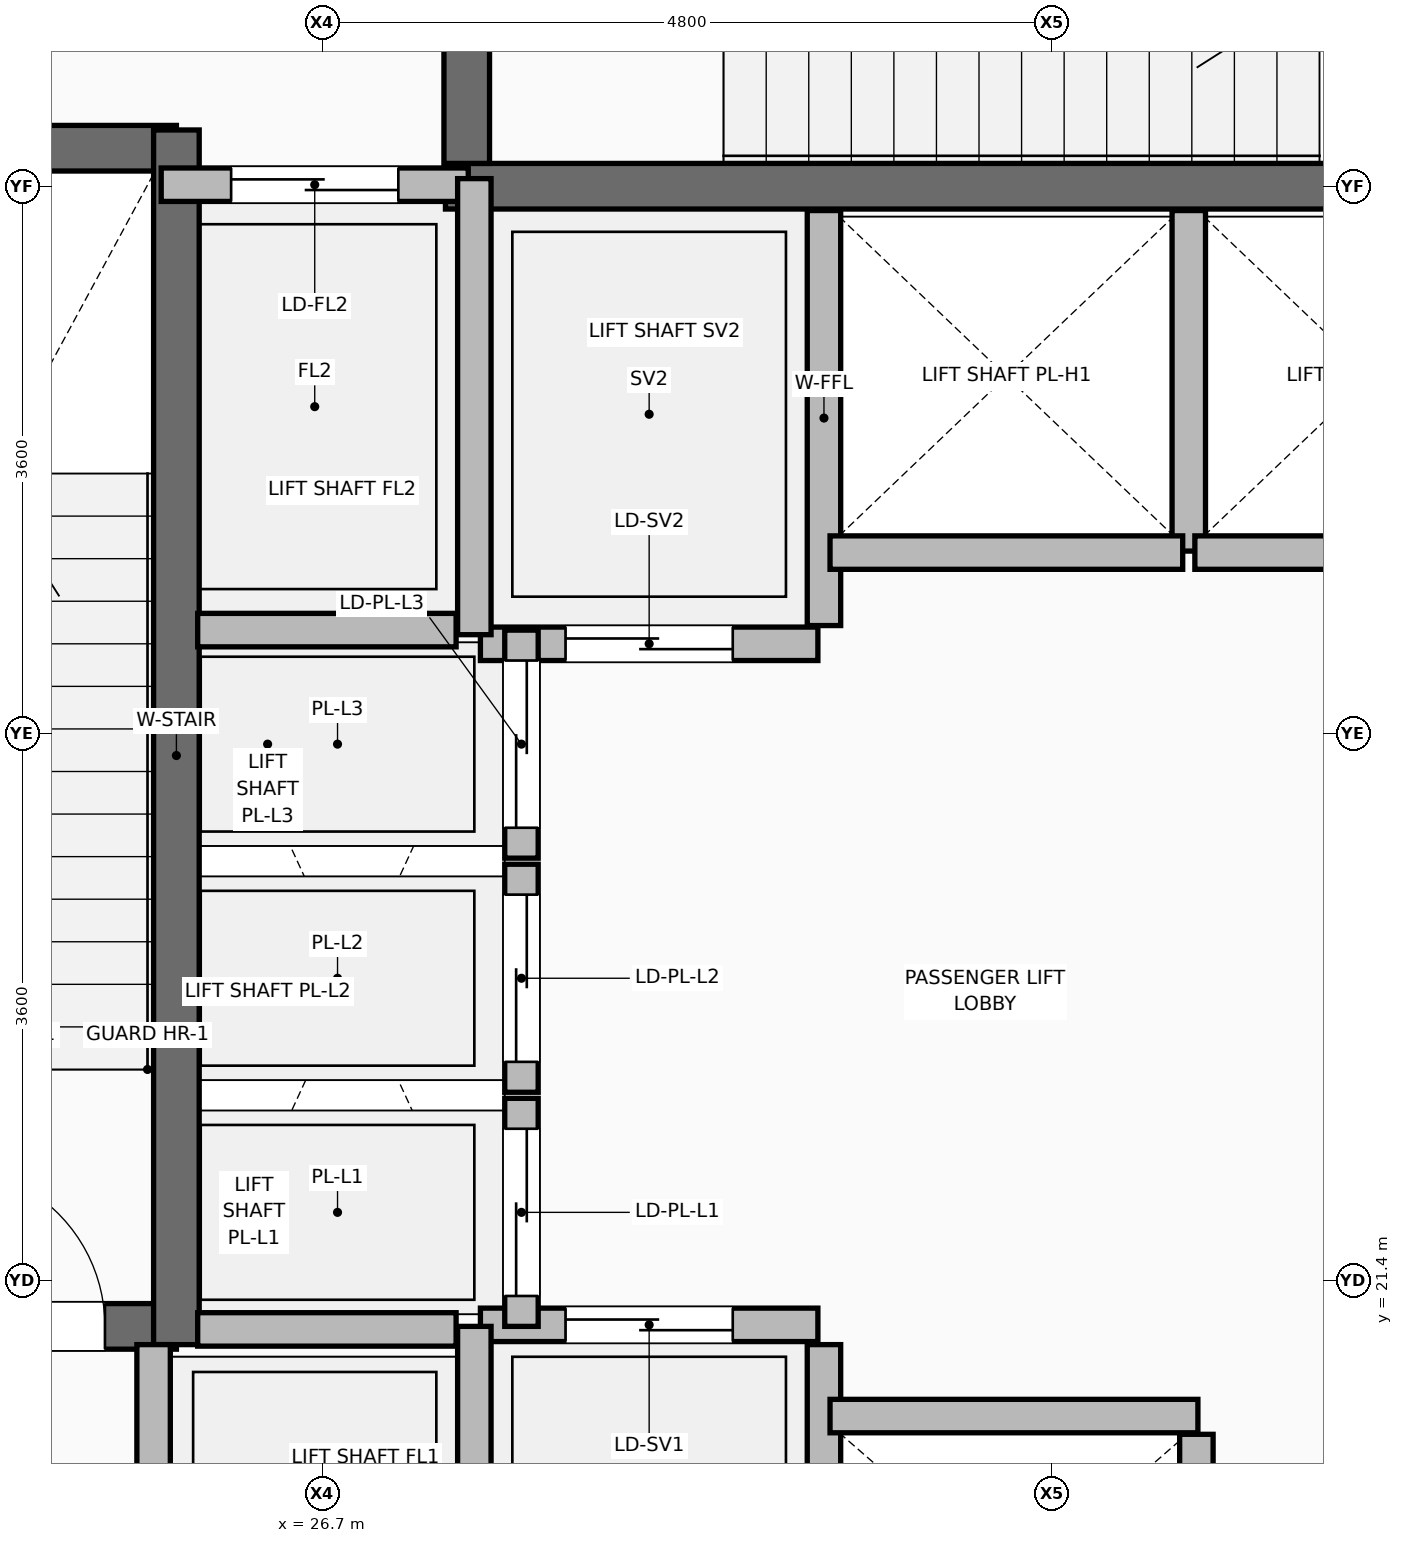
"""IFC4 building model, lengths in metres.
Left out: names, types, materials, properties, quantities, classifications, styles, units other than length and angle.
Written with IfcOpenShell. Run it as: python <this file> out.ifc"""

import sys

from ifc_helpers import new_model, si_unit, direction, frame, frame_2d, origin, place, context, subcontext, project, spatial, rectangle, extrude, element, fill, save


model = new_model("IFC4")
c1 = context("Model", 3, precision=1e-05, world=origin(), true_north=direction((0.0, 1.0)))
c2 = subcontext(c1, "Body", "Model", "MODEL_VIEW")
j1 = project(units=[si_unit("LENGTHUNIT", "METRE"), si_unit("PLANEANGLEUNIT", "RADIAN")], contexts=[c1])
p1 = place(None, origin())
s1 = spatial("IfcSite", under=j1, at=p1, CompositionType="ELEMENT")
p2 = place(p1, origin())
s2 = spatial("IfcBuilding", under=s1, at=p2, CompositionType="ELEMENT")
p3 = place(p2, frame((0.0, 0.0, 90.75)))
s3 = spatial("IfcBuildingStorey", under=s2, at=p3, CompositionType="ELEMENT", Elevation=90.75)
p4 = place(p3, frame((30.0, 18.08, 0.0), z_axis=(0.0, 0.0, 1.0), x_axis=(0.0, 1.0, 0.0)))
e1 = element("IfcWall", 1, at=p4, inside=s3, PredefinedType="PARTITIONING", context=c2, shape_type="SweptSolid", body=[
    extrude(rectangle(XDim=2.9, YDim=0.22, at=frame_2d((1.45, 0.0))), origin(), (0.0, 0.0, 1.0), 5.195),
])
p5 = place(p3, frame((32.45, 17.92, 0.0), z_axis=(0.0, 0.0, 1.0), x_axis=(0.0, 1.0, 0.0)))
e2 = element("IfcWall", 2, at=p5, inside=s3, PredefinedType="PARTITIONING", context=c2, shape_type="SweptSolid", body=[
    extrude(rectangle(XDim=2.47, YDim=0.22, at=frame_2d((1.235, 0.0))), origin(), (0.0, 0.0, 1.0), 4.578),
])
p6 = place(p3, frame((30.0, 25.71, 0.0), z_axis=(0.0, 0.0, 1.0), x_axis=(0.0, 1.0, 0.0)))
e3 = element("IfcWall", 3, at=p6, inside=s3, PredefinedType="PARTITIONING", context=c2, shape_type="SweptSolid", body=[
    extrude(rectangle(XDim=2.73, YDim=0.22, at=frame_2d((1.365, 0.0))), origin(), (0.0, 0.0, 1.0), 5.195),
])
p7 = place(p3, frame((32.4, 26.2, 0.0), z_axis=(0.0, 0.0, 1.0), x_axis=(0.0, 1.0, 0.0)))
e4 = element("IfcWall", 4, at=p7, inside=s3, PredefinedType="PARTITIONING", context=c2, shape_type="SweptSolid", body=[
    extrude(rectangle(XDim=2.24, YDim=0.22, at=frame_2d((1.12, 0.0))), origin(), (0.0, 0.0, 1.0), 5.195),
])
p8 = place(p3, frame((22.225, 21.1, 0.0), z_axis=(0.0, 0.0, 1.0), x_axis=(1.0, 0.0, 0.0)))
e5 = element("IfcWall", 5, at=p8, inside=s3, PredefinedType="SHEAR", context=c2, shape_type="SweptSolid", body=[
    extrude(rectangle(XDim=3.515, YDim=0.3, at=frame_2d((1.757, 0.0))), origin(), (0.0, 0.0, 1.0), 5.22),
])
p9 = place(p8, frame((1.995, 0.0, 0.0)))
e6 = element("IfcOpeningElement", 6, at=p9, cuts=e5, PredefinedType="OPENING", context=c2, shape_type="SweptSolid", body=[
    extrude(rectangle(XDim=1.05, YDim=2.1, at=frame_2d((0.525, 1.05))), frame((0.0, 0.16, 0.0), z_axis=(0.0, -1.0, 0.0), x_axis=(1.0, 0.0, 0.0)), (0.0, 0.0, 1.0), 0.32),
])
p10 = place(p3, frame((22.225, 28.85, 0.0), z_axis=(0.0, 0.0, 1.0), x_axis=(1.0, 0.0, 0.0)))
e7 = element("IfcWall", 7, at=p10, inside=s3, PredefinedType="SHEAR", context=c2, shape_type="SweptSolid", body=[
    extrude(rectangle(XDim=3.515, YDim=0.3, at=frame_2d((1.757, 0.0))), origin(), (0.0, 0.0, 1.0), 5.22),
])
p11 = place(p3, frame((25.74, 20.98, 0.0), z_axis=(0.0, 0.0, 1.0), x_axis=(0.0, 1.0, 0.0)))
e8 = element("IfcWall", 8, at=p11, inside=s3, PredefinedType="SHEAR", context=c2, shape_type="SweptSolid", body=[
    extrude(rectangle(XDim=7.99, YDim=0.3, at=frame_2d((3.995, 0.0))), origin(), (0.0, 0.0, 1.0), 5.22),
])
p12 = place(p3, frame((27.51, 28.6, 0.0), z_axis=(0.0, 0.0, 1.0), x_axis=(1.0, 0.0, 0.0)))
e9 = element("IfcWall", 9, at=p12, inside=s3, PredefinedType="SHEAR", context=c2, shape_type="SweptSolid", body=[
    extrude(rectangle(XDim=8.03, YDim=0.3, at=frame_2d((4.015, 0.0))), origin(), (0.0, 0.0, 1.0), 5.22),
])
p13 = place(p3, frame((27.65, 28.75, 0.0), z_axis=(0.0, 0.0, 1.0), x_axis=(0.0, 1.0, 0.0)))
e10 = element("IfcWall", 10, at=p13, inside=s3, PredefinedType="SHEAR", context=c2, shape_type="SweptSolid", body=[
    extrude(rectangle(XDim=3.375, YDim=0.3, at=frame_2d((1.688, 0.0))), origin(), (0.0, 0.0, 1.0), 5.22),
])
p14 = place(p13, frame((1.0, 0.0, 0.0)))
e11 = element("IfcOpeningElement", 11, at=p14, cuts=e10, PredefinedType="OPENING", context=c2, shape_type="SweptSolid", body=[
    extrude(rectangle(XDim=1.05, YDim=2.1, at=frame_2d((0.525, 1.05))), frame((0.0, 0.16, 0.0), z_axis=(0.0, -1.0, 0.0), x_axis=(1.0, 0.0, 0.0)), (0.0, 0.0, 1.0), 0.32),
])
p15 = place(p3, frame((25.59, 18.22, 0.0), z_axis=(0.0, 0.0, 1.0), x_axis=(0.0, 1.0, 0.0)))
e12 = element("IfcWall", 12, at=p15, inside=s3, PredefinedType="PARTITIONING", context=c2, shape_type="SweptSolid", body=[
    extrude(rectangle(XDim=2.76, YDim=0.22, at=frame_2d((1.38, 0.0))), origin(), (0.0, 0.0, 1.0), 5.2),
])
p16 = place(p15, frame((0.83, 0.0, 0.0)))
e13 = element("IfcOpeningElement", 13, at=p16, cuts=e12, PredefinedType="OPENING", context=c2, shape_type="SweptSolid", body=[
    extrude(rectangle(XDim=1.1, YDim=2.2, at=frame_2d((0.55, 1.1))), frame((0.0, 0.12, 0.0), z_axis=(0.0, -1.0, 0.0), x_axis=(1.0, 0.0, 0.0)), (0.0, 0.0, 1.0), 0.24),
])
p17 = place(p3, frame((25.64, 28.61, 0.0), z_axis=(0.0, 0.0, 1.0), x_axis=(1.0, 0.0, 0.0)))
e14 = element("IfcWall", 14, at=p17, inside=s3, PredefinedType="PARTITIONING", context=c2, shape_type="SweptSolid", body=[
    extrude(rectangle(XDim=2.02, YDim=0.22, at=frame_2d((1.01, 0.0))), origin(), (0.0, 0.0, 1.0), 5.2),
])
p18 = place(p17, frame((0.46, 0.0, 0.0)))
e15 = element("IfcOpeningElement", 15, at=p18, cuts=e14, PredefinedType="OPENING", context=c2, shape_type="SweptSolid", body=[
    extrude(rectangle(XDim=1.1, YDim=2.2, at=frame_2d((0.55, 1.1))), frame((0.0, 0.12, 0.0), z_axis=(0.0, -1.0, 0.0), x_axis=(1.0, 0.0, 0.0)), (0.0, 0.0, 1.0), 0.24),
])
p19 = place(p3, frame((27.74, 21.11, 0.0), z_axis=(0.0, 0.0, 1.0), x_axis=(1.0, 0.0, 0.0)))
e16 = element("IfcWall", 16, at=p19, inside=s3, PredefinedType="PARTITIONING", context=c2, shape_type="SweptSolid", body=[
    extrude(rectangle(XDim=2.22, YDim=0.22, at=frame_2d((1.11, 0.0))), origin(), (0.0, 0.0, 1.0), 5.2),
])
p20 = place(p19, frame((0.56, 0.0, 0.0)))
e17 = element("IfcOpeningElement", 17, at=p20, cuts=e16, PredefinedType="OPENING", context=c2, shape_type="SweptSolid", body=[
    extrude(rectangle(XDim=1.1, YDim=2.2, at=frame_2d((0.55, 1.1))), frame((0.0, 0.12, 0.0), z_axis=(0.0, -1.0, 0.0), x_axis=(1.0, 0.0, 0.0)), (0.0, 0.0, 1.0), 0.24),
])
p21 = place(p3, frame((27.74, 25.59, 0.0), z_axis=(0.0, 0.0, 1.0), x_axis=(1.0, 0.0, 0.0)))
e18 = element("IfcWall", 18, at=p21, inside=s3, PredefinedType="PARTITIONING", context=c2, shape_type="SweptSolid", body=[
    extrude(rectangle(XDim=2.22, YDim=0.22, at=frame_2d((1.11, 0.0))), origin(), (0.0, 0.0, 1.0), 5.2),
])
p22 = place(p21, frame((0.56, 0.0, 0.0)))
e19 = element("IfcOpeningElement", 19, at=p22, cuts=e18, PredefinedType="OPENING", context=c2, shape_type="SweptSolid", body=[
    extrude(rectangle(XDim=1.1, YDim=2.2, at=frame_2d((0.55, 1.1))), frame((0.0, 0.12, 0.0), z_axis=(0.0, -1.0, 0.0), x_axis=(1.0, 0.0, 0.0)), (0.0, 0.0, 1.0), 0.24),
])
p23 = place(p3, frame((30.04, 20.51, 0.0), z_axis=(0.0, 0.0, 1.0), x_axis=(1.0, 0.0, 0.0)))
e20 = element("IfcWall", 20, at=p23, inside=s3, PredefinedType="PARTITIONING", context=c2, shape_type="SweptSolid", body=[
    extrude(rectangle(XDim=2.42, YDim=0.22, at=frame_2d((1.21, 0.0))), origin(), (0.0, 0.0, 1.0), 5.2),
])
for number, where, z_axis, x_axis in (
    (21, (30.04, 26.19, 0.0), (0.0, 0.0, 1.0), (1.0, 0.0, 0.0)),
    (22, (32.44, 26.19, 0.0), (0.0, 0.0, 1.0), (1.0, 0.0, 0.0)),
):
    element("IfcWall", number, at=place(p3, frame(where, z_axis=z_axis, x_axis=x_axis)), inside=s3, PredefinedType="PARTITIONING", context=c2, shape_type="SweptSolid", body=[
        extrude(rectangle(XDim=2.32, YDim=0.22, at=frame_2d((1.16, 0.0))), origin(), (0.0, 0.0, 1.0), 5.2),
    ])
p24 = place(p3, frame((28.01, 21.1, 0.0), z_axis=(0.0, 0.0, 1.0), x_axis=(0.0, 1.0, 0.0)))
e23 = element("IfcWall", 23, at=p24, inside=s3, PredefinedType="PARTITIONING", context=c2, shape_type="SweptSolid", body=[
    extrude(rectangle(XDim=1.5, YDim=0.22, at=frame_2d((0.75, 0.0))), origin(), (0.0, 0.0, 1.0), 5.2),
])
p25 = place(p24, frame((0.2, 0.0, 0.0)))
e24 = element("IfcOpeningElement", 24, at=p25, cuts=e23, PredefinedType="OPENING", context=c2, shape_type="SweptSolid", body=[
    extrude(rectangle(XDim=1.1, YDim=2.2, at=frame_2d((0.55, 1.1))), frame((0.0, 0.12, 0.0), z_axis=(0.0, -1.0, 0.0), x_axis=(1.0, 0.0, 0.0)), (0.0, 0.0, 1.0), 0.24),
])
p26 = place(p3, frame((28.01, 22.64, 0.0), z_axis=(0.0, 0.0, 1.0), x_axis=(0.0, 1.0, 0.0)))
e25 = element("IfcWall", 25, at=p26, inside=s3, PredefinedType="PARTITIONING", context=c2, shape_type="SweptSolid", body=[
    extrude(rectangle(XDim=1.5, YDim=0.22, at=frame_2d((0.75, 0.0))), origin(), (0.0, 0.0, 1.0), 5.2),
])
p27 = place(p26, frame((0.2, 0.0, 0.0)))
e26 = element("IfcOpeningElement", 26, at=p27, cuts=e25, PredefinedType="OPENING", context=c2, shape_type="SweptSolid", body=[
    extrude(rectangle(XDim=1.1, YDim=2.2, at=frame_2d((0.55, 1.1))), frame((0.0, 0.12, 0.0), z_axis=(0.0, -1.0, 0.0), x_axis=(1.0, 0.0, 0.0)), (0.0, 0.0, 1.0), 0.24),
])
p28 = place(p3, frame((28.01, 24.18, 0.0), z_axis=(0.0, 0.0, 1.0), x_axis=(0.0, 1.0, 0.0)))
e27 = element("IfcWall", 27, at=p28, inside=s3, PredefinedType="PARTITIONING", context=c2, shape_type="SweptSolid", body=[
    extrude(rectangle(XDim=1.5, YDim=0.22, at=frame_2d((0.75, 0.0))), origin(), (0.0, 0.0, 1.0), 5.2),
])
p29 = place(p28, frame((0.2, 0.0, 0.0)))
e28 = element("IfcOpeningElement", 28, at=p29, cuts=e27, PredefinedType="OPENING", context=c2, shape_type="SweptSolid", body=[
    extrude(rectangle(XDim=1.1, YDim=2.2, at=frame_2d((0.55, 1.1))), frame((0.0, 0.12, 0.0), z_axis=(0.0, -1.0, 0.0), x_axis=(1.0, 0.0, 0.0)), (0.0, 0.0, 1.0), 0.24),
])
p30 = place(p3, frame((27.7, 18.15, 0.0), z_axis=(0.0, 0.0, 1.0), x_axis=(0.0, 1.0, 0.0)))
e29 = element("IfcWall", 29, at=p30, inside=s3, PredefinedType="PARTITIONING", context=c2, shape_type="SweptSolid", body=[
    extrude(rectangle(XDim=2.95, YDim=0.22, at=frame_2d((1.475, 0.0))), origin(), (0.0, 0.0, 1.0), 5.2),
])
p31 = place(p3, frame((27.7, 25.65, 0.0), z_axis=(0.0, 0.0, 1.0), x_axis=(0.0, 1.0, 0.0)))
e30 = element("IfcWall", 30, at=p31, inside=s3, PredefinedType="PARTITIONING", context=c2, shape_type="SweptSolid", body=[
    extrude(rectangle(XDim=3.0, YDim=0.22, at=frame_2d((1.5, 0.0))), origin(), (0.0, 0.0, 1.0), 5.2),
])
for number, where, z_axis, x_axis in (
    (31, (25.88, 21.08, 0.0), (0.0, 0.0, 1.0), (1.0, 0.0, 0.0)),
    (32, (25.88, 25.68, 0.0), (0.0, 0.0, 1.0), (1.0, 0.0, 0.0)),
):
    element("IfcWall", number, at=place(p3, frame(where, z_axis=z_axis, x_axis=x_axis)), inside=s3, PredefinedType="PARTITIONING", context=c2, shape_type="SweptSolid", body=[
        extrude(rectangle(XDim=1.7, YDim=0.22, at=frame_2d((0.85, 0.0))), origin(), (0.0, 0.0, 1.0), 5.2),
    ])
p32 = place(p9, origin())
e33 = element("IfcDoor", 33, at=p32, inside=s3, OperationType="SINGLE_SWING_LEFT", PredefinedType="DOOR", context=c2, shape_type="SweptSolid", body=[
    extrude(rectangle(XDim=1.05, YDim=2.1, at=frame_2d((0.525, 1.05))), frame((0.0, 0.025, 0.0), z_axis=(0.0, -1.0, 0.0), x_axis=(1.0, 0.0, 0.0)), (0.0, 0.0, 1.0), 0.05),
])
fill(e6, e33)
p33 = place(p18, origin())
e34 = element("IfcDoor", 34, at=p33, inside=s3, OperationType="DOUBLE_DOOR_SLIDING", PredefinedType="DOOR", context=c2, shape_type="SweptSolid", body=[
    extrude(rectangle(XDim=1.1, YDim=2.2, at=frame_2d((0.55, 1.1))), frame((0.0, 0.025, 0.0), z_axis=(0.0, -1.0, 0.0), x_axis=(1.0, 0.0, 0.0)), (0.0, 0.0, 1.0), 0.05),
])
fill(e15, e34)
p34 = place(p20, origin())
e35 = element("IfcDoor", 35, at=p34, inside=s3, OperationType="DOUBLE_DOOR_SLIDING", PredefinedType="DOOR", context=c2, shape_type="SweptSolid", body=[
    extrude(rectangle(XDim=1.1, YDim=2.2, at=frame_2d((0.55, 1.1))), frame((0.0, 0.025, 0.0), z_axis=(0.0, -1.0, 0.0), x_axis=(1.0, 0.0, 0.0)), (0.0, 0.0, 1.0), 0.05),
])
fill(e17, e35)
p35 = place(p22, frame((1.1, 0.0, 0.0), z_axis=(0.0, 0.0, 1.0), x_axis=(-1.0, 0.0, 0.0)))
e36 = element("IfcDoor", 36, at=p35, inside=s3, OperationType="DOUBLE_DOOR_SLIDING", PredefinedType="DOOR", context=c2, shape_type="SweptSolid", body=[
    extrude(rectangle(XDim=1.1, YDim=2.2, at=frame_2d((0.55, 1.1))), frame((0.0, 0.025, 0.0), z_axis=(0.0, -1.0, 0.0), x_axis=(1.0, 0.0, 0.0)), (0.0, 0.0, 1.0), 0.05),
])
fill(e19, e36)
p36 = place(p25, frame((1.1, 0.0, 0.0), z_axis=(0.0, 0.0, 1.0), x_axis=(-1.0, 0.0, 0.0)))
e37 = element("IfcDoor", 37, at=p36, inside=s3, OperationType="DOUBLE_DOOR_SLIDING", PredefinedType="DOOR", context=c2, shape_type="SweptSolid", body=[
    extrude(rectangle(XDim=1.1, YDim=2.2, at=frame_2d((0.55, 1.1))), frame((0.0, 0.025, 0.0), z_axis=(0.0, -1.0, 0.0), x_axis=(1.0, 0.0, 0.0)), (0.0, 0.0, 1.0), 0.05),
])
fill(e24, e37)
p37 = place(p27, frame((1.1, 0.0, 0.0), z_axis=(0.0, 0.0, 1.0), x_axis=(-1.0, 0.0, 0.0)))
e38 = element("IfcDoor", 38, at=p37, inside=s3, OperationType="DOUBLE_DOOR_SLIDING", PredefinedType="DOOR", context=c2, shape_type="SweptSolid", body=[
    extrude(rectangle(XDim=1.1, YDim=2.2, at=frame_2d((0.55, 1.1))), frame((0.0, 0.025, 0.0), z_axis=(0.0, -1.0, 0.0), x_axis=(1.0, 0.0, 0.0)), (0.0, 0.0, 1.0), 0.05),
])
fill(e26, e38)
p38 = place(p29, frame((1.1, 0.0, 0.0), z_axis=(0.0, 0.0, 1.0), x_axis=(-1.0, 0.0, 0.0)))
e39 = element("IfcDoor", 39, at=p38, inside=s3, OperationType="DOUBLE_DOOR_SLIDING", PredefinedType="DOOR", context=c2, shape_type="SweptSolid", body=[
    extrude(rectangle(XDim=1.1, YDim=2.2, at=frame_2d((0.55, 1.1))), frame((0.0, 0.025, 0.0), z_axis=(0.0, -1.0, 0.0), x_axis=(1.0, 0.0, 0.0)), (0.0, 0.0, 1.0), 0.05),
])
fill(e28, e39)
save(model, sys.argv[1])
